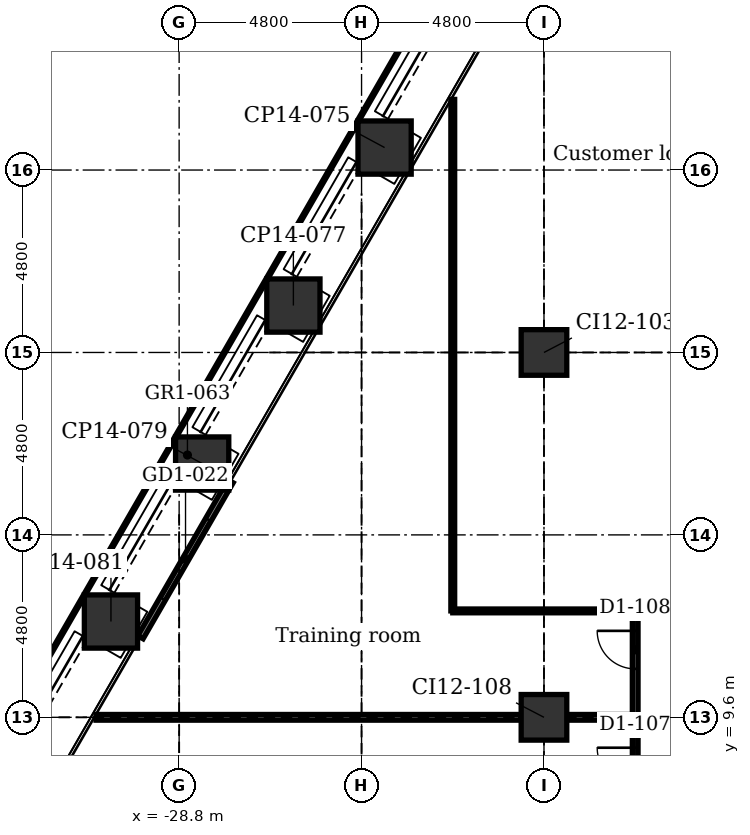
"""IFC4 building model, lengths in metres.
Left out: names, types, materials, properties, quantities, classifications, styles, units other than length and angle.
Written with IfcOpenShell. Run it as: python <this file> out.ifc"""

import sys

from ifc_helpers import new_model, si_unit, direction, frame, frame_2d, origin, origin_2d, place, context, subcontext, project, spatial, rectangle, extrude, element, fill, save


model = new_model("IFC4")
c1 = context("Model", 3, precision=1e-05, world=origin(), true_north=direction((0.0, 1.0)))
c2 = subcontext(c1, "Body", "Model", "MODEL_VIEW")
j1 = project(units=[si_unit("LENGTHUNIT", "METRE"), si_unit("PLANEANGLEUNIT", "RADIAN")], contexts=[c1])
p1 = place(None, origin())
s1 = spatial("IfcSite", under=j1, at=p1, CompositionType="ELEMENT")
p2 = place(p1, origin())
s2 = spatial("IfcBuilding", under=s1, at=p2, CompositionType="ELEMENT")
p3 = place(p2, frame((0.0, 0.0, 38.9)))
s3 = spatial("IfcBuildingStorey", under=s2, at=p3, CompositionType="ELEMENT", Elevation=38.9)
for number, where, z_axis, x_axis in (
    (1, (-32.994, 7.964, -0.25), (0.0, 0.0, 1.0), (0.5, 0.866, 0.0)),
    (2, (-30.594, 12.121, -0.25), (0.0, 0.0, 1.0), (0.5, 0.866, 0.0)),
    (3, (-28.194, 16.278, -0.25), (0.0, 0.0, 1.0), (0.5, 0.866, 0.0)),
    (4, (-25.794, 20.435, -0.25), (0.0, 0.0, 1.0), (0.5, 0.866, 0.0)),
    (5, (-23.394, 24.592, -0.25), (0.0, 0.0, 1.0), (0.5, 0.866, 0.0)),
):
    element("IfcColumn", number, at=place(p3, frame(where, z_axis=z_axis, x_axis=x_axis)), inside=s3, PredefinedType="COLUMN", context=c2, shape_type="SweptSolid", body=[
        extrude(rectangle(XDim=1.4, YDim=1.4, at=origin_2d()), origin(), (0.0, 0.0, 1.0), 5.5),
    ])
for number, where, z_axis, x_axis in (
    (6, (-19.2, 9.6, -0.25), (0.0, 0.0, 1.0), (1.0, 0.0, 0.0)),
    (7, (-19.2, 19.2, -0.25), (0.0, 0.0, 1.0), (1.0, 0.0, 0.0)),
):
    element("IfcColumn", number, at=place(p3, frame(where, z_axis=z_axis, x_axis=x_axis)), inside=s3, PredefinedType="COLUMN", context=c2, shape_type="SweptSolid", body=[
        extrude(rectangle(XDim=1.2, YDim=1.2, at=origin_2d()), origin(), (0.0, 0.0, 1.0), 5.5),
    ])
p4 = place(p3, frame((-29.817, 11.707, 0.0), z_axis=(0.0, 0.0, 1.0), x_axis=(0.499978080042, 0.866038058908, 0.0)))
e8 = element("IfcWall", 8, at=p4, inside=s3, PredefinedType="PARTITIONING", context=c2, shape_type="SweptSolid", body=[
    extrude(rectangle(XDim=4.74, YDim=0.16, at=frame_2d((2.37, 0.0))), origin(), (0.0, 0.0, 1.0), 5.25),
])
p5 = place(p4, frame((1.17, 0.0, 0.0)))
e9 = element("IfcOpeningElement", 9, at=p5, cuts=e8, PredefinedType="OPENING", context=c2, shape_type="SweptSolid", body=[
    extrude(rectangle(XDim=2.4, YDim=2.4, at=frame_2d((1.2, 1.2))), frame((0.0, 0.09, 0.0), z_axis=(0.0, -1.0, 0.0), x_axis=(1.0, 0.0, 0.0)), (0.0, 0.0, 1.0), 0.18),
])
p6 = place(p3, frame((-16.8, 3.95, 0.0), z_axis=(0.0, 0.0, 1.0), x_axis=(0.0, 1.0, 0.0)))
e10 = element("IfcWall", 10, at=p6, inside=s3, PredefinedType="PARTITIONING", context=c2, shape_type="SweptSolid", body=[
    extrude(rectangle(XDim=8.45, YDim=0.15, at=frame_2d((4.225, 0.0))), origin(), (0.0, 0.0, 1.0), 5.25),
])
p7 = place(p6, frame((0.95, 0.0, 0.0)))
e11 = element("IfcOpeningElement", 11, at=p7, cuts=e10, PredefinedType="OPENING", context=c2, shape_type="SweptSolid", body=[
    extrude(rectangle(XDim=1.0, YDim=2.1, at=frame_2d((0.5, 1.05))), frame((0.0, 0.085, 0.0), z_axis=(0.0, -1.0, 0.0), x_axis=(1.0, 0.0, 0.0)), (0.0, 0.0, 1.0), 0.17),
])
p8 = place(p6, frame((3.85, 0.0, 0.0)))
e12 = element("IfcOpeningElement", 12, at=p8, cuts=e10, PredefinedType="OPENING", context=c2, shape_type="SweptSolid", body=[
    extrude(rectangle(XDim=1.0, YDim=2.1, at=frame_2d((0.5, 1.05))), frame((0.0, 0.085, 0.0), z_axis=(0.0, -1.0, 0.0), x_axis=(1.0, 0.0, 0.0)), (0.0, 0.0, 1.0), 0.17),
])
p9 = place(p6, frame((6.925, 0.0, 0.0)))
e13 = element("IfcOpeningElement", 13, at=p9, cuts=e10, PredefinedType="OPENING", context=c2, shape_type="SweptSolid", body=[
    extrude(rectangle(XDim=1.0, YDim=2.1, at=frame_2d((0.5, 1.05))), frame((0.0, 0.085, 0.0), z_axis=(0.0, -1.0, 0.0), x_axis=(1.0, 0.0, 0.0)), (0.0, 0.0, 1.0), 0.17),
])
p10 = place(p3, frame((-21.6, 12.4, 0.0), z_axis=(0.0, 0.0, 1.0), x_axis=(0.0, 1.0, 0.0)))
e14 = element("IfcWall", 14, at=p10, inside=s3, PredefinedType="PARTITIONING", context=c2, shape_type="SweptSolid", body=[
    extrude(rectangle(XDim=13.458, YDim=0.1, at=frame_2d((6.729, 0.0))), origin(), (0.0, 0.0, 1.0), 5.25),
])
p11 = place(p3, frame((-30.987, 9.6, 0.0), z_axis=(0.0, 0.0, 1.0), x_axis=(1.0, 0.0, 0.0)))
e15 = element("IfcWall", 15, at=p11, inside=s3, PredefinedType="PARTITIONING", context=c2, shape_type="SweptSolid", body=[
    extrude(rectangle(XDim=11.187, YDim=0.15, at=frame_2d((5.593, 0.0))), origin(), (0.0, 0.0, 1.0), 4.488),
])
p12 = place(p3, frame((-18.6, 9.6, 0.0), z_axis=(0.0, 0.0, 1.0), x_axis=(1.0, 0.0, 0.0)))
e16 = element("IfcWall", 16, at=p12, inside=s3, PredefinedType="PARTITIONING", context=c2, shape_type="SweptSolid", body=[
    extrude(rectangle(XDim=1.8, YDim=0.15, at=frame_2d((0.9, 0.0))), origin(), (0.0, 0.0, 1.0), 4.642),
])
p13 = place(p3, frame((-21.6, 12.4, 0.0), z_axis=(0.0, 0.0, 1.0), x_axis=(1.0, 0.0, 0.0)))
e17 = element("IfcWall", 17, at=p13, inside=s3, PredefinedType="PARTITIONING", context=c2, shape_type="SweptSolid", body=[
    extrude(rectangle(XDim=4.8, YDim=0.1, at=frame_2d((2.4, 0.0))), origin(), (0.0, 0.0, 1.0), 5.25),
])
p14 = place(p3, frame((-16.8, 12.4, 0.0), z_axis=(0.0, 0.0, 1.0), x_axis=(1.0, 0.0, 0.0)))
e18 = element("IfcWall", 18, at=p14, inside=s3, PredefinedType="PARTITIONING", context=c2, shape_type="SweptSolid", body=[
    extrude(rectangle(XDim=38.4, YDim=0.15, at=frame_2d((19.2, 0.0))), origin(), (0.0, 0.0, 1.0), 5.25),
])
p15 = place(p14, frame((2.7, 0.0, 0.0)))
e19 = element("IfcOpeningElement", 19, at=p15, cuts=e18, PredefinedType="OPENING", context=c2, shape_type="SweptSolid", body=[
    extrude(rectangle(XDim=1.8, YDim=2.1, at=frame_2d((0.9, 1.05))), frame((0.0, 0.085, 0.0), z_axis=(0.0, -1.0, 0.0), x_axis=(1.0, 0.0, 0.0)), (0.0, 0.0, 1.0), 0.17),
])
p16 = place(p14, frame((9.535, 0.0, 0.0)))
e20 = element("IfcOpeningElement", 20, at=p16, cuts=e18, PredefinedType="OPENING", context=c2, shape_type="SweptSolid", body=[
    extrude(rectangle(XDim=1.0, YDim=2.1, at=frame_2d((0.5, 1.05))), frame((0.0, 0.085, 0.0), z_axis=(0.0, -1.0, 0.0), x_axis=(1.0, 0.0, 0.0)), (0.0, 0.0, 1.0), 0.17),
])
p17 = place(p14, frame((14.335, 0.0, 0.0)))
e21 = element("IfcOpeningElement", 21, at=p17, cuts=e18, PredefinedType="OPENING", context=c2, shape_type="SweptSolid", body=[
    extrude(rectangle(XDim=1.0, YDim=2.1, at=frame_2d((0.5, 1.05))), frame((0.0, 0.085, 0.0), z_axis=(0.0, -1.0, 0.0), x_axis=(1.0, 0.0, 0.0)), (0.0, 0.0, 1.0), 0.17),
])
p18 = place(p14, frame((19.425, 0.0, 0.0)))
e22 = element("IfcOpeningElement", 22, at=p18, cuts=e18, PredefinedType="OPENING", context=c2, shape_type="SweptSolid", body=[
    extrude(rectangle(XDim=1.0, YDim=2.1, at=frame_2d((0.5, 1.05))), frame((0.0, 0.085, 0.0), z_axis=(0.0, -1.0, 0.0), x_axis=(1.0, 0.0, 0.0)), (0.0, 0.0, 1.0), 0.17),
])
p19 = place(p14, frame((23.065, 0.0, 0.0)))
e23 = element("IfcOpeningElement", 23, at=p19, cuts=e18, PredefinedType="OPENING", context=c2, shape_type="SweptSolid", body=[
    extrude(rectangle(XDim=1.0, YDim=2.1, at=frame_2d((0.5, 1.05))), frame((0.0, 0.085, 0.0), z_axis=(0.0, -1.0, 0.0), x_axis=(1.0, 0.0, 0.0)), (0.0, 0.0, 1.0), 0.17),
])
p20 = place(p14, frame((27.865, 0.0, 0.0)))
e24 = element("IfcOpeningElement", 24, at=p20, cuts=e18, PredefinedType="OPENING", context=c2, shape_type="SweptSolid", body=[
    extrude(rectangle(XDim=1.0, YDim=2.1, at=frame_2d((0.5, 1.05))), frame((0.0, 0.085, 0.0), z_axis=(0.0, -1.0, 0.0), x_axis=(1.0, 0.0, 0.0)), (0.0, 0.0, 1.0), 0.17),
])
p21 = place(p14, frame((31.975, 0.0, 0.0)))
e25 = element("IfcOpeningElement", 25, at=p21, cuts=e18, PredefinedType="OPENING", context=c2, shape_type="SweptSolid", body=[
    extrude(rectangle(XDim=1.0, YDim=2.1, at=frame_2d((0.5, 1.05))), frame((0.0, 0.085, 0.0), z_axis=(0.0, -1.0, 0.0), x_axis=(1.0, 0.0, 0.0)), (0.0, 0.0, 1.0), 0.17),
])
p22 = place(p5, origin())
e26 = element("IfcDoor", 26, at=p22, inside=s3, OperationType="DOUBLE_DOOR_SLIDING", PredefinedType="DOOR", context=c2, shape_type="SweptSolid", body=[
    extrude(rectangle(XDim=2.4, YDim=2.4, at=frame_2d((1.2, 1.2))), frame((0.0, 0.025, 0.0), z_axis=(0.0, -1.0, 0.0), x_axis=(1.0, 0.0, 0.0)), (0.0, 0.0, 1.0), 0.05),
])
fill(e9, e26)
p23 = place(p8, origin())
e27 = element("IfcDoor", 27, at=p23, inside=s3, OperationType="SINGLE_SWING_RIGHT", PredefinedType="DOOR", context=c2, shape_type="SweptSolid", body=[
    extrude(rectangle(XDim=1.0, YDim=2.1, at=frame_2d((0.5, 1.05))), frame((0.0, 0.025, 0.0), z_axis=(0.0, -1.0, 0.0), x_axis=(1.0, 0.0, 0.0)), (0.0, 0.0, 1.0), 0.05),
])
fill(e12, e27)
p24 = place(p9, origin())
e28 = element("IfcDoor", 28, at=p24, inside=s3, OperationType="SINGLE_SWING_RIGHT", PredefinedType="DOOR", context=c2, shape_type="SweptSolid", body=[
    extrude(rectangle(XDim=1.0, YDim=2.1, at=frame_2d((0.5, 1.05))), frame((0.0, 0.025, 0.0), z_axis=(0.0, -1.0, 0.0), x_axis=(1.0, 0.0, 0.0)), (0.0, 0.0, 1.0), 0.05),
])
fill(e13, e28)
save(model, sys.argv[1])
